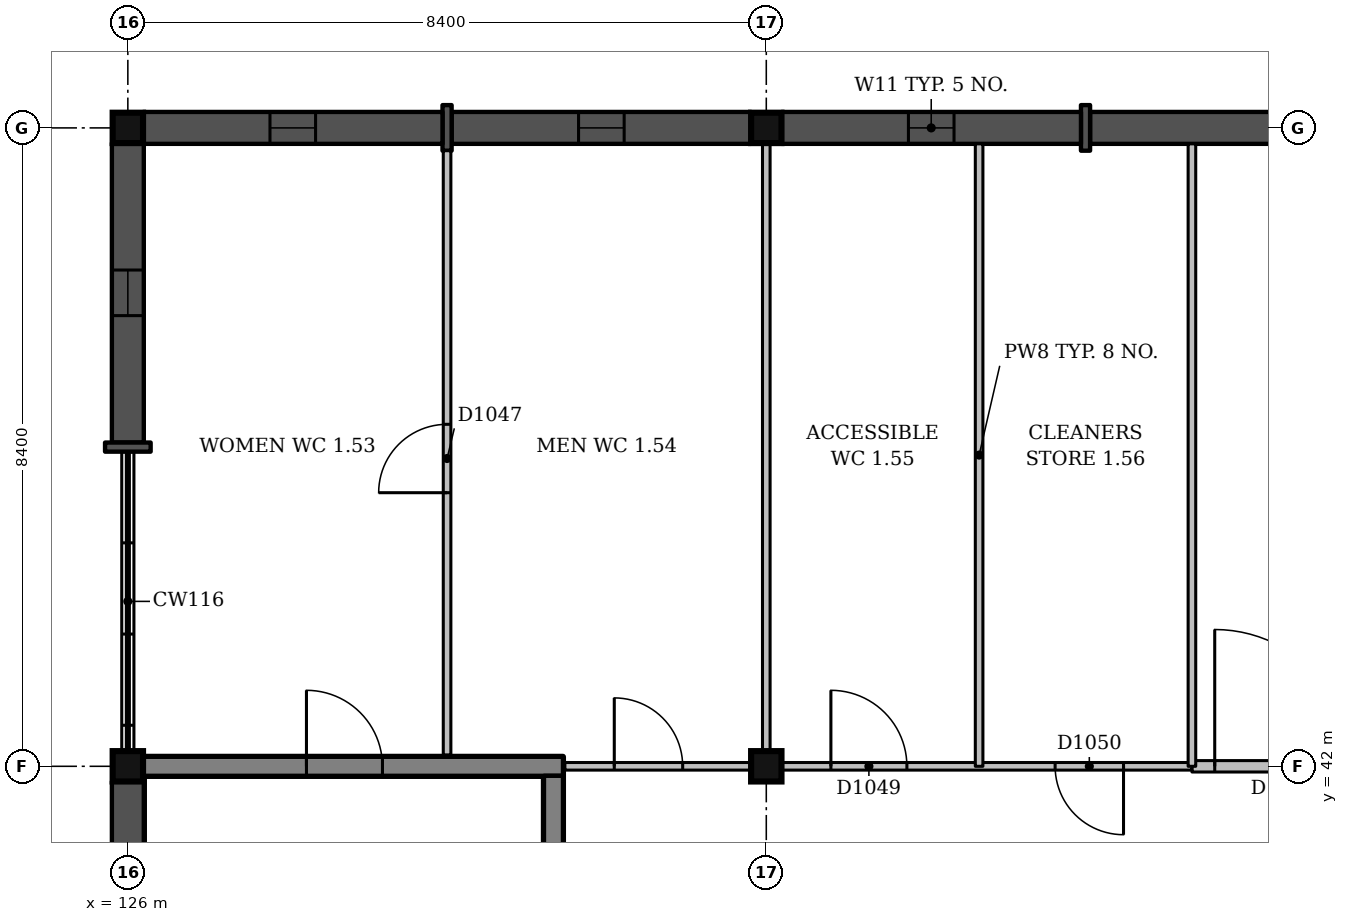
"""IFC4 building model, lengths in metres.
Left out: names, types, materials, properties, quantities, classifications, styles, units other than length and angle.
Written with IfcOpenShell. Run it as: python <this file> out.ifc"""

import sys

from ifc_helpers import new_model, si_unit, direction, frame, frame_2d, origin, origin_2d, place, context, subcontext, project, spatial, rectangle, extrude, element, fill, save


model = new_model("IFC4")
c1 = context("Model", 3, precision=1e-05, world=origin(), true_north=direction((0.0, 1.0)))
c2 = subcontext(c1, "Body", "Model", "MODEL_VIEW")
j1 = project(units=[si_unit("LENGTHUNIT", "METRE"), si_unit("PLANEANGLEUNIT", "RADIAN")], contexts=[c1])
p1 = place(None, origin())
s1 = spatial("IfcSite", under=j1, at=p1, CompositionType="ELEMENT")
p2 = place(p1, origin())
s2 = spatial("IfcBuilding", under=s1, at=p2, CompositionType="ELEMENT")
p3 = place(p2, frame((0.0, 0.0, 4.5)))
s3 = spatial("IfcBuildingStorey", under=s2, at=p3, CompositionType="ELEMENT", Elevation=4.5)
for number, where, z_axis, x_axis in (
    (1, (126.0, 42.0, 0.0), (0.0, 0.0, 1.0), (1.0, 0.0, 0.0)),
    (2, (126.0, 50.4, 0.0), (0.0, 0.0, 1.0), (1.0, 0.0, 0.0)),
    (3, (134.4, 42.0, 0.0), (0.0, 0.0, 1.0), (1.0, 0.0, 0.0)),
    (4, (134.4, 50.4, 0.0), (0.0, 0.0, 1.0), (1.0, 0.0, 0.0)),
):
    element("IfcColumn", number, at=place(p3, frame(where, z_axis=z_axis, x_axis=x_axis)), inside=s3, PredefinedType="COLUMN", context=c2, shape_type="SweptSolid", body=[
        extrude(rectangle(XDim=0.4, YDim=0.4, at=origin_2d()), origin(), (0.0, 0.0, 1.0), 4.5),
    ])
p4 = place(p3, frame((126.2, 42.0, 0.0), z_axis=(0.0, 0.0, 1.0), x_axis=(1.0, 0.0, 0.0)))
e5 = element("IfcWall", 5, at=p4, inside=s3, PredefinedType="SHEAR", context=c2, shape_type="SweptSolid", body=[
    extrude(rectangle(XDim=5.525, YDim=0.25, at=frame_2d((2.763, 0.0))), origin(), (0.0, 0.0, 1.0), 4.5),
])
p5 = place(p4, frame((2.15, 0.0, 0.0)))
e6 = element("IfcOpeningElement", 6, at=p5, cuts=e5, PredefinedType="OPENING", context=c2, shape_type="SweptSolid", body=[
    extrude(rectangle(XDim=1.0, YDim=2.1, at=frame_2d((0.5, 1.05))), frame((0.0, 0.135, 0.0), z_axis=(0.0, -1.0, 0.0), x_axis=(1.0, 0.0, 0.0)), (0.0, 0.0, 1.0), 0.27),
])
p6 = place(p3, frame((131.6, 37.81, 0.0), z_axis=(0.0, 0.0, 1.0), x_axis=(0.0, 1.0, 0.0)))
e7 = element("IfcWall", 7, at=p6, inside=s3, PredefinedType="SHEAR", context=c2, shape_type="SweptSolid", body=[
    extrude(rectangle(XDim=4.065, YDim=0.25, at=frame_2d((2.032, 0.0))), origin(), (0.0, 0.0, 1.0), 4.5),
])
p7 = place(p3, frame((126.0, 50.2, 0.0), z_axis=(0.0, 0.0, 1.0), x_axis=(0.0, -1.0, 0.0)))
e8 = element("IfcWall", 8, at=p7, inside=s3, PredefinedType="SOLIDWALL", context=c2, shape_type="SweptSolid", body=[
    extrude(rectangle(XDim=3.94, YDim=0.42, at=frame_2d((1.97, 0.0))), origin(), (0.0, 0.0, 1.0), 3.5),
])
p8 = place(p7, frame((1.67, 0.0, 1.5)))
e9 = element("IfcOpeningElement", 9, at=p8, cuts=e8, PredefinedType="OPENING", context=c2, shape_type="SweptSolid", body=[
    extrude(rectangle(XDim=0.6, YDim=1.2, at=frame_2d((0.3, 0.6))), frame((0.0, 0.22, 0.0), z_axis=(0.0, -1.0, 0.0), x_axis=(1.0, 0.0, 0.0)), (0.0, 0.0, 1.0), 0.44),
])
p9 = place(p3, frame((126.0, 46.26, 0.0), z_axis=(0.0, 0.0, 1.0), x_axis=(0.0, -1.0, 0.0)))
e10 = element("IfcWall", 10, at=p9, inside=s3, PredefinedType="SOLIDWALL", context=c2, shape_type="SweptSolid", body=[
    extrude(rectangle(XDim=0.12, YDim=0.6, at=frame_2d((0.06, 0.0))), origin(), (0.0, 0.0, 1.0), 3.5),
])
p10 = place(p3, frame((126.0, 41.8, 0.0), z_axis=(0.0, 0.0, 1.0), x_axis=(0.0, -1.0, 0.0)))
e11 = element("IfcWall", 11, at=p10, inside=s3, PredefinedType="SOLIDWALL", context=c2, shape_type="SweptSolid", body=[
    extrude(rectangle(XDim=3.94, YDim=0.42, at=frame_2d((1.97, 0.0))), origin(), (0.0, 0.0, 1.0), 3.75),
])
p11 = place(p3, frame((142.6, 50.4, 0.0), z_axis=(0.0, 0.0, 1.0), x_axis=(-1.0, 0.0, 0.0)))
e12 = element("IfcWall", 12, at=p11, inside=s3, PredefinedType="SOLIDWALL", context=c2, shape_type="SweptSolid", body=[
    extrude(rectangle(XDim=3.94, YDim=0.42, at=frame_2d((1.97, 0.0))), origin(), (0.0, 0.0, 1.0), 3.5),
])
p12 = place(p3, frame((138.66, 50.4, 0.0), z_axis=(0.0, 0.0, 1.0), x_axis=(-1.0, 0.0, 0.0)))
e13 = element("IfcWall", 13, at=p12, inside=s3, PredefinedType="SOLIDWALL", context=c2, shape_type="SweptSolid", body=[
    extrude(rectangle(XDim=0.12, YDim=0.6, at=frame_2d((0.06, 0.0))), origin(), (0.0, 0.0, 1.0), 3.5),
])
p13 = place(p3, frame((138.54, 50.4, 0.0), z_axis=(0.0, 0.0, 1.0), x_axis=(-1.0, 0.0, 0.0)))
e14 = element("IfcWall", 14, at=p13, inside=s3, PredefinedType="SOLIDWALL", context=c2, shape_type="SweptSolid", body=[
    extrude(rectangle(XDim=3.94, YDim=0.42, at=frame_2d((1.97, 0.0))), origin(), (0.0, 0.0, 1.0), 3.5),
])
p14 = place(p13, frame((1.67, 0.0, 1.5)))
e15 = element("IfcOpeningElement", 15, at=p14, cuts=e14, PredefinedType="OPENING", context=c2, shape_type="SweptSolid", body=[
    extrude(rectangle(XDim=0.6, YDim=1.2, at=frame_2d((0.3, 0.6))), frame((0.0, 0.22, 0.0), z_axis=(0.0, -1.0, 0.0), x_axis=(1.0, 0.0, 0.0)), (0.0, 0.0, 1.0), 0.44),
])
p15 = place(p3, frame((134.2, 50.4, 0.0), z_axis=(0.0, 0.0, 1.0), x_axis=(-1.0, 0.0, 0.0)))
e16 = element("IfcWall", 16, at=p15, inside=s3, PredefinedType="SOLIDWALL", context=c2, shape_type="SweptSolid", body=[
    extrude(rectangle(XDim=3.94, YDim=0.42, at=frame_2d((1.97, 0.0))), origin(), (0.0, 0.0, 1.0), 3.5),
])
p16 = place(p15, frame((1.67, 0.0, 1.5)))
e17 = element("IfcOpeningElement", 17, at=p16, cuts=e16, PredefinedType="OPENING", context=c2, shape_type="SweptSolid", body=[
    extrude(rectangle(XDim=0.6, YDim=1.2, at=frame_2d((0.3, 0.6))), frame((0.0, 0.22, 0.0), z_axis=(0.0, -1.0, 0.0), x_axis=(1.0, 0.0, 0.0)), (0.0, 0.0, 1.0), 0.44),
])
p17 = place(p3, frame((130.26, 50.4, 0.0), z_axis=(0.0, 0.0, 1.0), x_axis=(-1.0, 0.0, 0.0)))
e18 = element("IfcWall", 18, at=p17, inside=s3, PredefinedType="SOLIDWALL", context=c2, shape_type="SweptSolid", body=[
    extrude(rectangle(XDim=0.12, YDim=0.6, at=frame_2d((0.06, 0.0))), origin(), (0.0, 0.0, 1.0), 3.5),
])
p18 = place(p3, frame((130.14, 50.4, 0.0), z_axis=(0.0, 0.0, 1.0), x_axis=(-1.0, 0.0, 0.0)))
e19 = element("IfcWall", 19, at=p18, inside=s3, PredefinedType="SOLIDWALL", context=c2, shape_type="SweptSolid", body=[
    extrude(rectangle(XDim=3.94, YDim=0.42, at=frame_2d((1.97, 0.0))), origin(), (0.0, 0.0, 1.0), 3.5),
])
p19 = place(p18, frame((1.67, 0.0, 1.5)))
e20 = element("IfcOpeningElement", 20, at=p19, cuts=e19, PredefinedType="OPENING", context=c2, shape_type="SweptSolid", body=[
    extrude(rectangle(XDim=0.6, YDim=1.2, at=frame_2d((0.3, 0.6))), frame((0.0, 0.22, 0.0), z_axis=(0.0, -1.0, 0.0), x_axis=(1.0, 0.0, 0.0)), (0.0, 0.0, 1.0), 0.44),
])
p20 = place(p3, frame((140.0, 42.0, 0.0), z_axis=(0.0, 0.0, 1.0), x_axis=(1.0, 0.0, 0.0)))
e21 = element("IfcWall", 21, at=p20, inside=s3, PredefinedType="PARTITIONING", context=c2, shape_type="SweptSolid", body=[
    extrude(rectangle(XDim=2.6, YDim=0.15, at=frame_2d((1.3, 0.0))), origin(), (0.0, 0.0, 1.0), 3.55),
])
p21 = place(p20, frame((0.3, 0.0, 0.0)))
e22 = element("IfcOpeningElement", 22, at=p21, cuts=e21, PredefinedType="OPENING", context=c2, shape_type="SweptSolid", body=[
    extrude(rectangle(XDim=1.8, YDim=2.1, at=frame_2d((0.9, 1.05))), frame((0.0, 0.085, 0.0), z_axis=(0.0, -1.0, 0.0), x_axis=(1.0, 0.0, 0.0)), (0.0, 0.0, 1.0), 0.17),
])
p22 = place(p3, frame((131.75, 42.0, 0.0), z_axis=(0.0, 0.0, 1.0), x_axis=(1.0, 0.0, 0.0)))
e23 = element("IfcWall", 23, at=p22, inside=s3, PredefinedType="PARTITIONING", context=c2, shape_type="SweptSolid", body=[
    extrude(rectangle(XDim=2.45, YDim=0.1, at=frame_2d((1.225, 0.0))), origin(), (0.0, 0.0, 1.0), 3.65),
])
p23 = place(p22, frame((0.65, 0.0, 0.0)))
e24 = element("IfcOpeningElement", 24, at=p23, cuts=e23, PredefinedType="OPENING", context=c2, shape_type="SweptSolid", body=[
    extrude(rectangle(XDim=0.9, YDim=2.1, at=frame_2d((0.45, 1.05))), frame((0.0, 0.06, 0.0), z_axis=(0.0, -1.0, 0.0), x_axis=(1.0, 0.0, 0.0)), (0.0, 0.0, 1.0), 0.12),
])
p24 = place(p3, frame((134.6, 42.0, 0.0), z_axis=(0.0, 0.0, 1.0), x_axis=(1.0, 0.0, 0.0)))
e25 = element("IfcWall", 25, at=p24, inside=s3, PredefinedType="PARTITIONING", context=c2, shape_type="SweptSolid", body=[
    extrude(rectangle(XDim=5.4, YDim=0.1, at=frame_2d((2.7, 0.0))), origin(), (0.0, 0.0, 1.0), 3.55),
])
p25 = place(p24, frame((0.65, 0.0, 0.0)))
e26 = element("IfcOpeningElement", 26, at=p25, cuts=e25, PredefinedType="OPENING", context=c2, shape_type="SweptSolid", body=[
    extrude(rectangle(XDim=1.0, YDim=2.1, at=frame_2d((0.5, 1.05))), frame((0.0, 0.06, 0.0), z_axis=(0.0, -1.0, 0.0), x_axis=(1.0, 0.0, 0.0)), (0.0, 0.0, 1.0), 0.12),
])
p26 = place(p24, frame((3.6, 0.0, 0.0)))
e27 = element("IfcOpeningElement", 27, at=p26, cuts=e25, PredefinedType="OPENING", context=c2, shape_type="SweptSolid", body=[
    extrude(rectangle(XDim=0.9, YDim=2.1, at=frame_2d((0.45, 1.05))), frame((0.0, 0.06, 0.0), z_axis=(0.0, -1.0, 0.0), x_axis=(1.0, 0.0, 0.0)), (0.0, 0.0, 1.0), 0.12),
])
p27 = place(p3, frame((130.2, 42.15, 0.0), z_axis=(0.0, 0.0, 1.0), x_axis=(0.0, 1.0, 0.0)))
e28 = element("IfcWall", 28, at=p27, inside=s3, PredefinedType="PARTITIONING", context=c2, shape_type="SweptSolid", body=[
    extrude(rectangle(XDim=7.95, YDim=0.1, at=frame_2d((3.975, 0.0))), origin(), (0.0, 0.0, 1.0), 4.15),
])
p28 = place(p27, frame((3.45, 0.0, 0.0)))
e29 = element("IfcOpeningElement", 29, at=p28, cuts=e28, PredefinedType="OPENING", context=c2, shape_type="SweptSolid", body=[
    extrude(rectangle(XDim=0.9, YDim=2.1, at=frame_2d((0.45, 1.05))), frame((0.0, 0.06, 0.0), z_axis=(0.0, -1.0, 0.0), x_axis=(1.0, 0.0, 0.0)), (0.0, 0.0, 1.0), 0.12),
])
p29 = place(p3, frame((134.4, 42.2, 0.0), z_axis=(0.0, 0.0, 1.0), x_axis=(0.0, 1.0, 0.0)))
e30 = element("IfcWall", 30, at=p29, inside=s3, PredefinedType="PARTITIONING", context=c2, shape_type="SweptSolid", body=[
    extrude(rectangle(XDim=8.0, YDim=0.1, at=frame_2d((4.0, 0.0))), origin(), (0.0, 0.0, 1.0), 3.55),
])
for number, where, z_axis, x_axis in (
    (31, (137.2, 42.0, 0.0), (0.0, 0.0, 1.0), (0.0, 1.0, 0.0)),
    (32, (140.0, 42.0, 0.0), (0.0, 0.0, 1.0), (0.0, 1.0, 0.0)),
):
    element("IfcWall", number, at=place(p3, frame(where, z_axis=z_axis, x_axis=x_axis)), inside=s3, PredefinedType="PARTITIONING", context=c2, shape_type="SweptSolid", body=[
        extrude(rectangle(XDim=8.19, YDim=0.1, at=frame_2d((4.095, 0.0))), origin(), (0.0, 0.0, 1.0), 3.55),
    ])
p30 = place(p8, origin())
e33 = element("IfcWindow", 33, at=p30, inside=s3, PartitioningType="SINGLE_PANEL", PredefinedType="WINDOW", context=c2, shape_type="SweptSolid", body=[
    extrude(rectangle(XDim=0.6, YDim=1.2, at=frame_2d((0.3, 0.6))), frame((0.0, 0.15, 0.0), z_axis=(0.0, -1.0, 0.0), x_axis=(1.0, 0.0, 0.0)), (0.0, 0.0, 1.0), 0.06),
])
fill(e9, e33)
p31 = place(p14, origin())
e34 = element("IfcWindow", 34, at=p31, inside=s3, PartitioningType="SINGLE_PANEL", PredefinedType="WINDOW", context=c2, shape_type="SweptSolid", body=[
    extrude(rectangle(XDim=0.6, YDim=1.2, at=frame_2d((0.3, 0.6))), frame((0.0, 0.15, 0.0), z_axis=(0.0, -1.0, 0.0), x_axis=(1.0, 0.0, 0.0)), (0.0, 0.0, 1.0), 0.06),
])
fill(e15, e34)
p32 = place(p16, origin())
e35 = element("IfcWindow", 35, at=p32, inside=s3, PartitioningType="SINGLE_PANEL", PredefinedType="WINDOW", context=c2, shape_type="SweptSolid", body=[
    extrude(rectangle(XDim=0.6, YDim=1.2, at=frame_2d((0.3, 0.6))), frame((0.0, 0.15, 0.0), z_axis=(0.0, -1.0, 0.0), x_axis=(1.0, 0.0, 0.0)), (0.0, 0.0, 1.0), 0.06),
])
fill(e17, e35)
p33 = place(p19, origin())
e36 = element("IfcWindow", 36, at=p33, inside=s3, PartitioningType="SINGLE_PANEL", PredefinedType="WINDOW", context=c2, shape_type="SweptSolid", body=[
    extrude(rectangle(XDim=0.6, YDim=1.2, at=frame_2d((0.3, 0.6))), frame((0.0, 0.15, 0.0), z_axis=(0.0, -1.0, 0.0), x_axis=(1.0, 0.0, 0.0)), (0.0, 0.0, 1.0), 0.06),
])
fill(e20, e36)
p34 = place(p28, origin())
e37 = element("IfcDoor", 37, at=p34, inside=s3, OperationType="SINGLE_SWING_LEFT", PredefinedType="DOOR", context=c2, shape_type="SweptSolid", body=[
    extrude(rectangle(XDim=0.9, YDim=2.1, at=frame_2d((0.45, 1.05))), frame((0.0, 0.025, 0.0), z_axis=(0.0, -1.0, 0.0), x_axis=(1.0, 0.0, 0.0)), (0.0, 0.0, 1.0), 0.05),
])
fill(e29, e37)
p35 = place(p23, origin())
e38 = element("IfcDoor", 38, at=p35, inside=s3, OperationType="SINGLE_SWING_LEFT", PredefinedType="DOOR", context=c2, shape_type="SweptSolid", body=[
    extrude(rectangle(XDim=0.9, YDim=2.1, at=frame_2d((0.45, 1.05))), frame((0.0, 0.025, 0.0), z_axis=(0.0, -1.0, 0.0), x_axis=(1.0, 0.0, 0.0)), (0.0, 0.0, 1.0), 0.05),
])
fill(e24, e38)
p36 = place(p25, origin())
e39 = element("IfcDoor", 39, at=p36, inside=s3, OperationType="SINGLE_SWING_LEFT", PredefinedType="DOOR", context=c2, shape_type="SweptSolid", body=[
    extrude(rectangle(XDim=1.0, YDim=2.1, at=frame_2d((0.5, 1.05))), frame((0.0, 0.025, 0.0), z_axis=(0.0, -1.0, 0.0), x_axis=(1.0, 0.0, 0.0)), (0.0, 0.0, 1.0), 0.05),
])
fill(e26, e39)
p37 = place(p26, origin())
e40 = element("IfcDoor", 40, at=p37, inside=s3, OperationType="SINGLE_SWING_RIGHT", PredefinedType="DOOR", context=c2, shape_type="SweptSolid", body=[
    extrude(rectangle(XDim=0.9, YDim=2.1, at=frame_2d((0.45, 1.05))), frame((0.0, 0.025, 0.0), z_axis=(0.0, -1.0, 0.0), x_axis=(1.0, 0.0, 0.0)), (0.0, 0.0, 1.0), 0.05),
])
fill(e27, e40)
p38 = place(p21, origin())
e41 = element("IfcDoor", 41, at=p38, inside=s3, OperationType="DOUBLE_DOOR_SINGLE_SWING", PredefinedType="DOOR", context=c2, shape_type="SweptSolid", body=[
    extrude(rectangle(XDim=1.8, YDim=2.1, at=frame_2d((0.9, 1.05))), frame((0.0, 0.025, 0.0), z_axis=(0.0, -1.0, 0.0), x_axis=(1.0, 0.0, 0.0)), (0.0, 0.0, 1.0), 0.05),
])
fill(e22, e41)
p39 = place(p5, origin())
e42 = element("IfcDoor", 42, at=p39, inside=s3, OperationType="SINGLE_SWING_LEFT", PredefinedType="DOOR", context=c2, shape_type="SweptSolid", body=[
    extrude(rectangle(XDim=1.0, YDim=2.1, at=frame_2d((0.5, 1.05))), frame((0.0, 0.025, 0.0), z_axis=(0.0, -1.0, 0.0), x_axis=(1.0, 0.0, 0.0)), (0.0, 0.0, 1.0), 0.05),
])
fill(e6, e42)
save(model, sys.argv[1])
